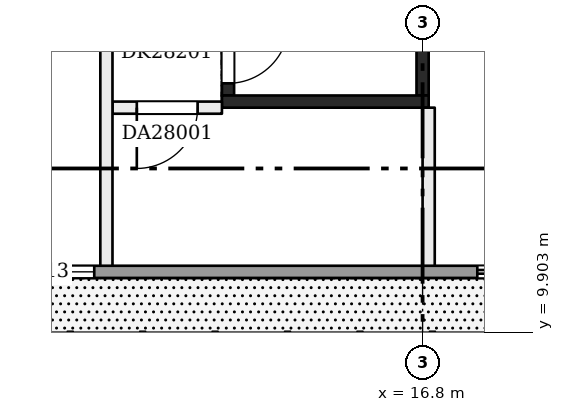
"""IFC4 building model, lengths in metres.
Left out: names, types, materials, properties, quantities, classifications, styles, units other than length and angle.
Written with IfcOpenShell. Run it as: python <this file> out.ifc"""

import sys

from ifc_helpers import new_model, si_unit, direction, frame, frame_2d, origin, place, context, subcontext, project, spatial, rectangle, extrude, element, fill, save


model = new_model("IFC4")
c1 = context("Model", 3, precision=1e-05, world=origin(), true_north=direction((0.0, 1.0)))
c2 = subcontext(c1, "Body", "Model", "MODEL_VIEW")
j1 = project(units=[si_unit("LENGTHUNIT", "METRE"), si_unit("PLANEANGLEUNIT", "RADIAN")], contexts=[c1])
p1 = place(None, origin())
s1 = spatial("IfcSite", under=j1, at=p1, CompositionType="ELEMENT")
p2 = place(p1, origin())
s2 = spatial("IfcBuilding", under=s1, at=p2, CompositionType="ELEMENT")
p3 = place(p2, frame((0.0, 0.0, 112.7)))
s3 = spatial("IfcBuildingStorey", under=s2, at=p3, CompositionType="ELEMENT", Elevation=112.7)
p4 = place(p3, frame((13.6, 13.8, 0.0), z_axis=(0.0, 0.0, 1.0), x_axis=(0.0, 1.0, 0.0)))
e1 = element("IfcWall", 1, at=p4, inside=s3, PredefinedType="SHEAR", context=c2, shape_type="SweptSolid", body=[
    extrude(rectangle(XDim=6.8, YDim=0.2, at=frame_2d((3.4, 0.0))), origin(), (0.0, 0.0, 1.0), 3.22),
])
p5 = place(p4, frame((0.2, 0.0, 0.0)))
e2 = element("IfcOpeningElement", 2, at=p5, cuts=e1, PredefinedType="OPENING", context=c2, shape_type="SweptSolid", body=[
    extrude(rectangle(XDim=1.0, YDim=2.1, at=frame_2d((0.5, 1.05))), frame((0.0, 0.11, 0.0), z_axis=(0.0, -1.0, 0.0), x_axis=(1.0, 0.0, 0.0)), (0.0, 0.0, 1.0), 0.22),
])
p6 = place(p3, frame((16.8, 13.8, 0.0), z_axis=(0.0, 0.0, 1.0), x_axis=(0.0, 1.0, 0.0)))
e3 = element("IfcWall", 3, at=p6, inside=s3, PredefinedType="SHEAR", context=c2, shape_type="SweptSolid", body=[
    extrude(rectangle(XDim=6.8, YDim=0.2, at=frame_2d((3.4, 0.0))), origin(), (0.0, 0.0, 1.0), 3.22),
])
p7 = place(p3, frame((13.5, 13.7, 0.0), z_axis=(0.0, 0.0, 1.0), x_axis=(1.0, 0.0, 0.0)))
e4 = element("IfcWall", 4, at=p7, inside=s3, PredefinedType="SHEAR", context=c2, shape_type="SweptSolid", body=[
    extrude(rectangle(XDim=3.4, YDim=0.2, at=frame_2d((1.7, 0.0))), origin(), (0.0, 0.0, 1.0), 3.22),
])
p8 = place(p3, frame((11.7, 13.6, 0.0), z_axis=(0.0, 0.0, 1.0), x_axis=(1.0, 0.0, 0.0)))
e5 = element("IfcWall", 5, at=p8, inside=s3, PredefinedType="PARTITIONING", context=c2, shape_type="SweptSolid", body=[
    extrude(rectangle(XDim=1.8, YDim=0.2, at=frame_2d((0.9, 0.0))), origin(), (0.0, 0.0, 1.0), 3.22),
])
p9 = place(p8, frame((0.4, 0.0, 0.0)))
e6 = element("IfcOpeningElement", 6, at=p9, cuts=e5, PredefinedType="OPENING", context=c2, shape_type="SweptSolid", body=[
    extrude(rectangle(XDim=1.0, YDim=2.1, at=frame_2d((0.5, 1.05))), frame((0.0, 0.11, 0.0), z_axis=(0.0, -1.0, 0.0), x_axis=(1.0, 0.0, 0.0)), (0.0, 0.0, 1.0), 0.22),
])
p10 = place(p3, frame((11.6, 10.9, 0.0), z_axis=(0.0, 0.0, 1.0), x_axis=(0.0, 1.0, 0.0)))
e7 = element("IfcWall", 7, at=p10, inside=s3, PredefinedType="PARTITIONING", context=c2, shape_type="SweptSolid", body=[
    extrude(rectangle(XDim=31.1, YDim=0.2, at=frame_2d((15.55, 0.0))), origin(), (0.0, 0.0, 1.0), 3.22),
])
p11 = place(p10, frame((6.3, 0.0, 0.0)))
e8 = element("IfcOpeningElement", 8, at=p11, cuts=e7, PredefinedType="OPENING", context=c2, shape_type="SweptSolid", body=[
    extrude(rectangle(XDim=1.0, YDim=2.1, at=frame_2d((0.5, 1.05))), frame((0.0, 0.11, 0.0), z_axis=(0.0, -1.0, 0.0), x_axis=(1.0, 0.0, 0.0)), (0.0, 0.0, 1.0), 0.22),
])
p12 = place(p10, frame((14.225, 0.0, 0.0)))
e9 = element("IfcOpeningElement", 9, at=p12, cuts=e7, PredefinedType="OPENING", context=c2, shape_type="SweptSolid", body=[
    extrude(rectangle(XDim=1.0, YDim=2.1, at=frame_2d((0.5, 1.05))), frame((0.0, 0.11, 0.0), z_axis=(0.0, -1.0, 0.0), x_axis=(1.0, 0.0, 0.0)), (0.0, 0.0, 1.0), 0.22),
])
p13 = place(p10, frame((29.333, 0.0, 0.0)))
e10 = element("IfcOpeningElement", 10, at=p13, cuts=e7, PredefinedType="OPENING", context=c2, shape_type="SweptSolid", body=[
    extrude(rectangle(XDim=1.0, YDim=2.1, at=frame_2d((0.5, 1.05))), frame((0.0, 0.11, 0.0), z_axis=(0.0, -1.0, 0.0), x_axis=(1.0, 0.0, 0.0)), (0.0, 0.0, 1.0), 0.22),
])
p14 = place(p3, frame((16.9, 10.9, 0.0), z_axis=(0.0, 0.0, 1.0), x_axis=(0.0, 1.0, 0.0)))
e11 = element("IfcWall", 11, at=p14, inside=s3, PredefinedType="PARTITIONING", context=c2, shape_type="SweptSolid", body=[
    extrude(rectangle(XDim=2.7, YDim=0.2, at=frame_2d((1.35, 0.0))), origin(), (0.0, 0.0, 1.0), 3.22),
])
p15 = place(p3, frame((4.8, 10.9, 0.0), z_axis=(0.0, 0.0, 1.0), x_axis=(1.0, 0.0, 0.0)))
e12 = element("IfcWall", 12, at=p15, inside=s3, PredefinedType="SOLIDWALL", context=c2, shape_type="SweptSolid", body=[
    extrude(rectangle(XDim=37.2, YDim=0.2, at=frame_2d((18.6, 0.0))), origin(), (0.0, 0.0, 1.0), 3.22),
])
p16 = place(p15, frame((0.3, 0.0, 0.9)))
e13 = element("IfcOpeningElement", 13, at=p16, cuts=e12, PredefinedType="OPENING", context=c2, shape_type="SweptSolid", body=[
    extrude(rectangle(XDim=2.4, YDim=1.5, at=frame_2d((1.2, 0.75))), frame((0.0, 0.11, 0.0), z_axis=(0.0, -1.0, 0.0), x_axis=(1.0, 0.0, 0.0)), (0.0, 0.0, 1.0), 0.22),
])
p17 = place(p15, frame((4.2, 0.0, 0.9)))
e14 = element("IfcOpeningElement", 14, at=p17, cuts=e12, PredefinedType="OPENING", context=c2, shape_type="SweptSolid", body=[
    extrude(rectangle(XDim=2.4, YDim=1.5, at=frame_2d((1.2, 0.75))), frame((0.0, 0.11, 0.0), z_axis=(0.0, -1.0, 0.0), x_axis=(1.0, 0.0, 0.0)), (0.0, 0.0, 1.0), 0.22),
])
p18 = place(p15, frame((12.9, 0.0, 0.0)))
e15 = element("IfcOpeningElement", 15, at=p18, cuts=e12, PredefinedType="OPENING", context=c2, shape_type="SweptSolid", body=[
    extrude(rectangle(XDim=2.4, YDim=2.2, at=frame_2d((1.2, 1.1))), frame((0.0, 0.11, 0.0), z_axis=(0.0, -1.0, 0.0), x_axis=(1.0, 0.0, 0.0)), (0.0, 0.0, 1.0), 0.22),
])
p19 = place(p15, frame((17.1, 0.0, 0.9)))
e16 = element("IfcOpeningElement", 16, at=p19, cuts=e12, PredefinedType="OPENING", context=c2, shape_type="SweptSolid", body=[
    extrude(rectangle(XDim=2.4, YDim=1.5, at=frame_2d((1.2, 0.75))), frame((0.0, 0.11, 0.0), z_axis=(0.0, -1.0, 0.0), x_axis=(1.0, 0.0, 0.0)), (0.0, 0.0, 1.0), 0.22),
])
p20 = place(p15, frame((21.3, 0.0, 0.9)))
e17 = element("IfcOpeningElement", 17, at=p20, cuts=e12, PredefinedType="OPENING", context=c2, shape_type="SweptSolid", body=[
    extrude(rectangle(XDim=2.4, YDim=1.5, at=frame_2d((1.2, 0.75))), frame((0.0, 0.11, 0.0), z_axis=(0.0, -1.0, 0.0), x_axis=(1.0, 0.0, 0.0)), (0.0, 0.0, 1.0), 0.22),
])
p21 = place(p15, frame((25.5, 0.0, 0.0)))
e18 = element("IfcOpeningElement", 18, at=p21, cuts=e12, PredefinedType="OPENING", context=c2, shape_type="SweptSolid", body=[
    extrude(rectangle(XDim=2.4, YDim=2.2, at=frame_2d((1.2, 1.1))), frame((0.0, 0.11, 0.0), z_axis=(0.0, -1.0, 0.0), x_axis=(1.0, 0.0, 0.0)), (0.0, 0.0, 1.0), 0.22),
])
p22 = place(p15, frame((29.7, 0.0, 0.9)))
e19 = element("IfcOpeningElement", 19, at=p22, cuts=e12, PredefinedType="OPENING", context=c2, shape_type="SweptSolid", body=[
    extrude(rectangle(XDim=2.4, YDim=1.5, at=frame_2d((1.2, 0.75))), frame((0.0, 0.11, 0.0), z_axis=(0.0, -1.0, 0.0), x_axis=(1.0, 0.0, 0.0)), (0.0, 0.0, 1.0), 0.22),
])
p23 = place(p15, frame((33.9, 0.0, 0.9)))
e20 = element("IfcOpeningElement", 20, at=p23, cuts=e12, PredefinedType="OPENING", context=c2, shape_type="SweptSolid", body=[
    extrude(rectangle(XDim=1.3, YDim=1.5, at=frame_2d((0.65, 0.75))), frame((0.0, 0.11, 0.0), z_axis=(0.0, -1.0, 0.0), x_axis=(1.0, 0.0, 0.0)), (0.0, 0.0, 1.0), 0.22),
])
p24 = place(p5, frame((1.0, 0.0, 0.0), z_axis=(0.0, 0.0, 1.0), x_axis=(-1.0, 0.0, 0.0)))
e21 = element("IfcDoor", 21, at=p24, inside=s3, OperationType="SINGLE_SWING_LEFT", PredefinedType="DOOR", context=c2, shape_type="SweptSolid", body=[
    extrude(rectangle(XDim=1.0, YDim=2.1, at=frame_2d((0.5, 1.05))), frame((0.0, 0.025, 0.0), z_axis=(0.0, -1.0, 0.0), x_axis=(1.0, 0.0, 0.0)), (0.0, 0.0, 1.0), 0.05),
])
fill(e2, e21)
p25 = place(p9, frame((1.0, 0.0, 0.0), z_axis=(0.0, 0.0, 1.0), x_axis=(-1.0, 0.0, 0.0)))
e22 = element("IfcDoor", 22, at=p25, inside=s3, OperationType="SINGLE_SWING_RIGHT", PredefinedType="DOOR", context=c2, shape_type="SweptSolid", body=[
    extrude(rectangle(XDim=1.0, YDim=2.1, at=frame_2d((0.5, 1.05))), frame((0.0, 0.025, 0.0), z_axis=(0.0, -1.0, 0.0), x_axis=(1.0, 0.0, 0.0)), (0.0, 0.0, 1.0), 0.05),
])
fill(e6, e22)
p26 = place(p17, origin())
e23 = element("IfcWindow", 23, at=p26, inside=s3, PartitioningType="SINGLE_PANEL", PredefinedType="WINDOW", context=c2, shape_type="SweptSolid", body=[
    extrude(rectangle(XDim=2.4, YDim=1.5, at=frame_2d((1.2, 0.75))), frame((0.0, 0.03, 0.0), z_axis=(0.0, -1.0, 0.0), x_axis=(1.0, 0.0, 0.0)), (0.0, 0.0, 1.0), 0.06),
])
fill(e14, e23)
p27 = place(p18, origin())
e24 = element("IfcDoor", 24, at=p27, inside=s3, OperationType="DOUBLE_DOOR_SLIDING", PredefinedType="DOOR", context=c2, shape_type="SweptSolid", body=[
    extrude(rectangle(XDim=2.4, YDim=2.2, at=frame_2d((1.2, 1.1))), frame((0.0, 0.025, 0.0), z_axis=(0.0, -1.0, 0.0), x_axis=(1.0, 0.0, 0.0)), (0.0, 0.0, 1.0), 0.05),
])
fill(e15, e24)
save(model, sys.argv[1])
